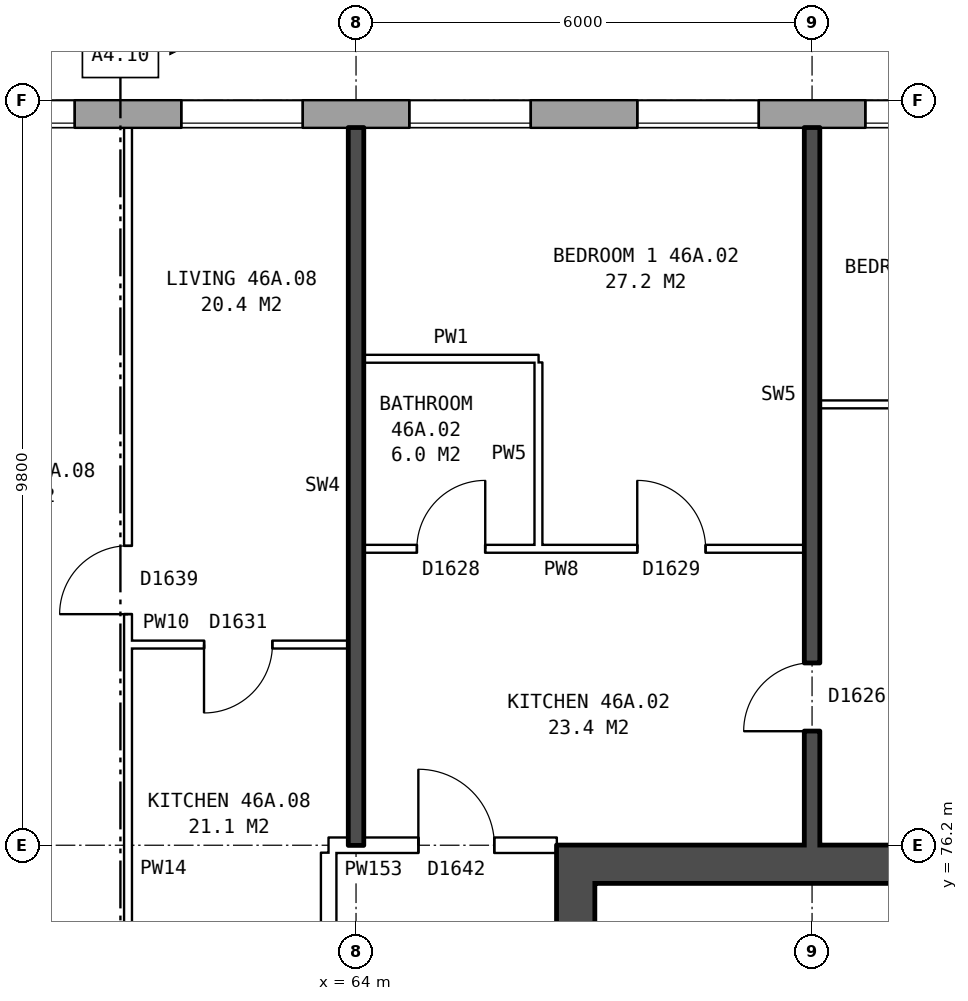
"""IFC4 building model, lengths in metres.
Left out: names, types, materials, properties, quantities, classifications, styles, units other than length and angle.
Written with IfcOpenShell. Run it as: python <this file> out.ifc"""

import sys

from ifc_helpers import new_model, si_unit, direction, frame, frame_2d, origin, place, context, subcontext, project, spatial, rectangle, extrude, element, fill, save


model = new_model("IFC4")
c1 = context("Model", 3, precision=1e-05, world=origin(), true_north=direction((0.0, 1.0)))
c2 = subcontext(c1, "Body", "Model", "MODEL_VIEW")
j1 = project(units=[si_unit("LENGTHUNIT", "METRE"), si_unit("PLANEANGLEUNIT", "RADIAN")], contexts=[c1])
p1 = place(None, origin())
s1 = spatial("IfcSite", under=j1, at=p1, CompositionType="ELEMENT")
p2 = place(p1, origin())
s2 = spatial("IfcBuilding", under=s1, at=p2, CompositionType="ELEMENT")
p3 = place(p2, frame((0.0, 0.0, 164.0)))
s3 = spatial("IfcBuildingStorey", under=s2, at=p3, CompositionType="ELEMENT", Elevation=164.0)
p4 = place(p3, frame((72.925, 85.82, 0.0), z_axis=(0.0, 0.0, 1.0), x_axis=(-1.0, 0.0, 0.0)))
e1 = element("IfcWall", 1, at=p4, inside=s3, PredefinedType="STANDARD", context=c2, shape_type="SweptSolid", body=[
    extrude(rectangle(XDim=41.351, YDim=0.36, at=frame_2d((20.675, 0.0))), origin(), (0.0, 0.0, 1.0), 2.85),
])
p5 = place(p4, frame((0.625, 0.0, 0.8)))
e2 = element("IfcOpeningElement", 2, at=p5, cuts=e1, PredefinedType="OPENING", context=c2, shape_type="SweptSolid", body=[
    extrude(rectangle(XDim=1.6, YDim=1.8, at=frame_2d((0.8, 0.9))), frame((0.0, 0.19, 0.0), z_axis=(0.0, -1.0, 0.0), x_axis=(1.0, 0.0, 0.0)), (0.0, 0.0, 1.0), 0.38),
])
p6 = place(p4, frame((3.625, 0.0, 0.8)))
e3 = element("IfcOpeningElement", 3, at=p6, cuts=e1, PredefinedType="OPENING", context=c2, shape_type="SweptSolid", body=[
    extrude(rectangle(XDim=1.6, YDim=1.8, at=frame_2d((0.8, 0.9))), frame((0.0, 0.19, 0.0), z_axis=(0.0, -1.0, 0.0), x_axis=(1.0, 0.0, 0.0)), (0.0, 0.0, 1.0), 0.38),
])
p7 = place(p4, frame((6.625, 0.0, 0.8)))
e4 = element("IfcOpeningElement", 4, at=p7, cuts=e1, PredefinedType="OPENING", context=c2, shape_type="SweptSolid", body=[
    extrude(rectangle(XDim=1.6, YDim=1.8, at=frame_2d((0.8, 0.9))), frame((0.0, 0.19, 0.0), z_axis=(0.0, -1.0, 0.0), x_axis=(1.0, 0.0, 0.0)), (0.0, 0.0, 1.0), 0.38),
])
p8 = place(p4, frame((9.625, 0.0, 0.8)))
e5 = element("IfcOpeningElement", 5, at=p8, cuts=e1, PredefinedType="OPENING", context=c2, shape_type="SweptSolid", body=[
    extrude(rectangle(XDim=1.6, YDim=1.8, at=frame_2d((0.8, 0.9))), frame((0.0, 0.19, 0.0), z_axis=(0.0, -1.0, 0.0), x_axis=(1.0, 0.0, 0.0)), (0.0, 0.0, 1.0), 0.38),
])
p9 = place(p4, frame((12.625, 0.0, 0.8)))
e6 = element("IfcOpeningElement", 6, at=p9, cuts=e1, PredefinedType="OPENING", context=c2, shape_type="SweptSolid", body=[
    extrude(rectangle(XDim=1.6, YDim=1.8, at=frame_2d((0.8, 0.9))), frame((0.0, 0.19, 0.0), z_axis=(0.0, -1.0, 0.0), x_axis=(1.0, 0.0, 0.0)), (0.0, 0.0, 1.0), 0.38),
])
p10 = place(p4, frame((15.625, 0.0, 0.8)))
e7 = element("IfcOpeningElement", 7, at=p10, cuts=e1, PredefinedType="OPENING", context=c2, shape_type="SweptSolid", body=[
    extrude(rectangle(XDim=1.6, YDim=1.8, at=frame_2d((0.8, 0.9))), frame((0.0, 0.19, 0.0), z_axis=(0.0, -1.0, 0.0), x_axis=(1.0, 0.0, 0.0)), (0.0, 0.0, 1.0), 0.38),
])
p11 = place(p4, frame((18.075, 0.0, 1.65)))
e8 = element("IfcOpeningElement", 8, at=p11, cuts=e1, PredefinedType="OPENING", context=c2, shape_type="SweptSolid", body=[
    extrude(rectangle(XDim=0.6, YDim=0.9, at=frame_2d((0.3, 0.45))), frame((0.0, 0.19, 0.0), z_axis=(0.0, -1.0, 0.0), x_axis=(1.0, 0.0, 0.0)), (0.0, 0.0, 1.0), 0.38),
])
p12 = place(p4, frame((21.125, 0.0, 0.15)))
e9 = element("IfcOpeningElement", 9, at=p12, cuts=e1, PredefinedType="OPENING", context=c2, shape_type="SweptSolid", body=[
    extrude(rectangle(XDim=1.0, YDim=0.9, at=frame_2d((0.5, 0.45))), frame((0.0, 0.19, 0.0), z_axis=(0.0, -1.0, 0.0), x_axis=(1.0, 0.0, 0.0)), (0.0, 0.0, 1.0), 0.38),
])
p13 = place(p4, frame((24.625, 0.0, 0.8)))
e10 = element("IfcOpeningElement", 10, at=p13, cuts=e1, PredefinedType="OPENING", context=c2, shape_type="SweptSolid", body=[
    extrude(rectangle(XDim=1.6, YDim=1.8, at=frame_2d((0.8, 0.9))), frame((0.0, 0.19, 0.0), z_axis=(0.0, -1.0, 0.0), x_axis=(1.0, 0.0, 0.0)), (0.0, 0.0, 1.0), 0.38),
])
p14 = place(p4, frame((27.625, 0.0, 0.8)))
e11 = element("IfcOpeningElement", 11, at=p14, cuts=e1, PredefinedType="OPENING", context=c2, shape_type="SweptSolid", body=[
    extrude(rectangle(XDim=1.6, YDim=1.8, at=frame_2d((0.8, 0.9))), frame((0.0, 0.19, 0.0), z_axis=(0.0, -1.0, 0.0), x_axis=(1.0, 0.0, 0.0)), (0.0, 0.0, 1.0), 0.38),
])
p15 = place(p4, frame((30.625, 0.0, 0.8)))
e12 = element("IfcOpeningElement", 12, at=p15, cuts=e1, PredefinedType="OPENING", context=c2, shape_type="SweptSolid", body=[
    extrude(rectangle(XDim=1.6, YDim=1.8, at=frame_2d((0.8, 0.9))), frame((0.0, 0.19, 0.0), z_axis=(0.0, -1.0, 0.0), x_axis=(1.0, 0.0, 0.0)), (0.0, 0.0, 1.0), 0.38),
])
p16 = place(p4, frame((33.625, 0.0, 0.8)))
e13 = element("IfcOpeningElement", 13, at=p16, cuts=e1, PredefinedType="OPENING", context=c2, shape_type="SweptSolid", body=[
    extrude(rectangle(XDim=1.6, YDim=1.8, at=frame_2d((0.8, 0.9))), frame((0.0, 0.19, 0.0), z_axis=(0.0, -1.0, 0.0), x_axis=(1.0, 0.0, 0.0)), (0.0, 0.0, 1.0), 0.38),
])
p17 = place(p4, frame((36.625, 0.0, 0.8)))
e14 = element("IfcOpeningElement", 14, at=p17, cuts=e1, PredefinedType="OPENING", context=c2, shape_type="SweptSolid", body=[
    extrude(rectangle(XDim=1.6, YDim=1.8, at=frame_2d((0.8, 0.9))), frame((0.0, 0.19, 0.0), z_axis=(0.0, -1.0, 0.0), x_axis=(1.0, 0.0, 0.0)), (0.0, 0.0, 1.0), 0.38),
])
p18 = place(p4, frame((19.225, 0.0, 0.15)))
e15 = element("IfcOpeningElement", 15, at=p18, cuts=e1, PredefinedType="OPENING", context=c2, shape_type="SweptSolid", body=[
    extrude(rectangle(XDim=0.6, YDim=0.9, at=frame_2d((0.3, 0.45))), frame((0.0, 0.19, 0.0), z_axis=(0.0, -1.0, 0.0), x_axis=(1.0, 0.0, 0.0)), (0.0, 0.0, 1.0), 0.38),
])
p19 = place(p4, frame((20.125, 0.0, 0.25)))
e16 = element("IfcOpeningElement", 16, at=p19, cuts=e1, PredefinedType="OPENING", context=c2, shape_type="SweptSolid", body=[
    extrude(rectangle(XDim=0.6, YDim=1.5, at=frame_2d((0.3, 0.75))), frame((0.0, 0.19, 0.0), z_axis=(0.0, -1.0, 0.0), x_axis=(1.0, 0.0, 0.0)), (0.0, 0.0, 1.0), 0.38),
])
p20 = place(p4, frame((22.625, 0.0, 1.65)))
e17 = element("IfcOpeningElement", 17, at=p20, cuts=e1, PredefinedType="OPENING", context=c2, shape_type="SweptSolid", body=[
    extrude(rectangle(XDim=1.0, YDim=0.9, at=frame_2d((0.5, 0.45))), frame((0.0, 0.19, 0.0), z_axis=(0.0, -1.0, 0.0), x_axis=(1.0, 0.0, 0.0)), (0.0, 0.0, 1.0), 0.38),
])
p21 = place(p3, frame((66.89, 63.8, 0.0), z_axis=(0.0, 0.0, 1.0), x_axis=(0.0, 1.0, 0.0)))
e18 = element("IfcWall", 18, at=p21, inside=s3, PredefinedType="SHEAR", context=c2, shape_type="SweptSolid", body=[
    extrude(rectangle(XDim=12.4, YDim=0.5, at=frame_2d((6.2, 0.0))), origin(), (0.0, 0.0, 1.0), 2.85),
])
p22 = place(p21, frame((1.325, 0.0, 0.0)))
e19 = element("IfcOpeningElement", 19, at=p22, cuts=e18, PredefinedType="OPENING", context=c2, shape_type="SweptSolid", body=[
    extrude(rectangle(XDim=1.1, YDim=2.1, at=frame_2d((0.55, 1.05))), frame((0.0, 0.26, 0.0), z_axis=(0.0, -1.0, 0.0), x_axis=(1.0, 0.0, 0.0)), (0.0, 0.0, 1.0), 0.52),
])
p23 = place(p21, frame((3.6, 0.0, 0.0)))
e20 = element("IfcOpeningElement", 20, at=p23, cuts=e18, PredefinedType="OPENING", context=c2, shape_type="SweptSolid", body=[
    extrude(rectangle(XDim=1.1, YDim=2.1, at=frame_2d((0.55, 1.05))), frame((0.0, 0.26, 0.0), z_axis=(0.0, -1.0, 0.0), x_axis=(1.0, 0.0, 0.0)), (0.0, 0.0, 1.0), 0.52),
])
p24 = place(p21, frame((5.8, 0.0, 0.0)))
e21 = element("IfcOpeningElement", 21, at=p24, cuts=e18, PredefinedType="OPENING", context=c2, shape_type="SweptSolid", body=[
    extrude(rectangle(XDim=1.1, YDim=2.1, at=frame_2d((0.55, 1.05))), frame((0.0, 0.26, 0.0), z_axis=(0.0, -1.0, 0.0), x_axis=(1.0, 0.0, 0.0)), (0.0, 0.0, 1.0), 0.52),
])
p25 = place(p21, frame((8.0, 0.0, 0.0)))
e22 = element("IfcOpeningElement", 22, at=p25, cuts=e18, PredefinedType="OPENING", context=c2, shape_type="SweptSolid", body=[
    extrude(rectangle(XDim=1.1, YDim=2.1, at=frame_2d((0.55, 1.05))), frame((0.0, 0.26, 0.0), z_axis=(0.0, -1.0, 0.0), x_axis=(1.0, 0.0, 0.0)), (0.0, 0.0, 1.0), 0.52),
])
p26 = place(p21, frame((9.9, 0.0, 0.0)))
e23 = element("IfcOpeningElement", 23, at=p26, cuts=e18, PredefinedType="OPENING", context=c2, shape_type="SweptSolid", body=[
    extrude(rectangle(XDim=1.1, YDim=2.1, at=frame_2d((0.55, 1.05))), frame((0.0, 0.26, 0.0), z_axis=(0.0, -1.0, 0.0), x_axis=(1.0, 0.0, 0.0)), (0.0, 0.0, 1.0), 0.52),
])
p27 = place(p3, frame((67.14, 75.95, 0.0), z_axis=(0.0, 0.0, 1.0), x_axis=(1.0, 0.0, 0.0)))
e24 = element("IfcWall", 24, at=p27, inside=s3, PredefinedType="SHEAR", context=c2, shape_type="SweptSolid", body=[
    extrude(rectangle(XDim=8.0, YDim=0.5, at=frame_2d((4.0, 0.0))), origin(), (0.0, 0.0, 1.0), 2.85),
])
p28 = place(p3, frame((63.64, 63.9, 0.0), z_axis=(0.0, 0.0, 1.0), x_axis=(0.0, 1.0, 0.0)))
e25 = element("IfcWall", 25, at=p28, inside=s3, PredefinedType="PARTITIONING", context=c2, shape_type="SweptSolid", body=[
    extrude(rectangle(XDim=12.2, YDim=0.2, at=frame_2d((6.1, 0.0))), origin(), (0.0, 0.0, 1.0), 2.85),
])
p29 = place(p28, frame((5.1, 0.0, 0.0)))
e26 = element("IfcOpeningElement", 26, at=p29, cuts=e25, PredefinedType="OPENING", context=c2, shape_type="SweptSolid", body=[
    extrude(rectangle(XDim=2.0, YDim=2.1, at=frame_2d((1.0, 1.05))), frame((0.0, 0.11, 0.0), z_axis=(0.0, -1.0, 0.0), x_axis=(1.0, 0.0, 0.0)), (0.0, 0.0, 1.0), 0.22),
])
p30 = place(p3, frame((63.64, 76.2, 0.0), z_axis=(0.0, 0.0, 1.0), x_axis=(1.0, 0.0, 0.0)))
e27 = element("IfcWall", 27, at=p30, inside=s3, PredefinedType="PARTITIONING", context=c2, shape_type="SweptSolid", body=[
    extrude(rectangle(XDim=3.0, YDim=0.2, at=frame_2d((1.5, 0.0))), origin(), (0.0, 0.0, 1.0), 2.85),
])
p31 = place(p30, frame((1.18, 0.0, 0.0)))
e28 = element("IfcOpeningElement", 28, at=p31, cuts=e27, PredefinedType="OPENING", context=c2, shape_type="SweptSolid", body=[
    extrude(rectangle(XDim=1.0, YDim=2.1, at=frame_2d((0.5, 1.05))), frame((0.0, 0.11, 0.0), z_axis=(0.0, -1.0, 0.0), x_axis=(1.0, 0.0, 0.0)), (0.0, 0.0, 1.0), 0.22),
])
p32 = place(p3, frame((61.0, 78.84, 0.0), z_axis=(0.0, 0.0, 1.0), x_axis=(1.0, 0.0, 0.0)))
e29 = element("IfcWall", 29, at=p32, inside=s3, PredefinedType="PARTITIONING", context=c2, shape_type="SweptSolid", body=[
    extrude(rectangle(XDim=2.9, YDim=0.1, at=frame_2d((1.45, 0.0))), origin(), (0.0, 0.0, 1.0), 2.85),
])
p33 = place(p32, frame((1.0, 0.0, 0.0)))
e30 = element("IfcOpeningElement", 30, at=p33, cuts=e29, PredefinedType="OPENING", context=c2, shape_type="SweptSolid", body=[
    extrude(rectangle(XDim=0.9, YDim=2.1, at=frame_2d((0.45, 1.05))), frame((0.0, 0.06, 0.0), z_axis=(0.0, -1.0, 0.0), x_axis=(1.0, 0.0, 0.0)), (0.0, 0.0, 1.0), 0.12),
])
p34 = place(p3, frame((64.1, 80.1, 0.0), z_axis=(0.0, 0.0, 1.0), x_axis=(1.0, 0.0, 0.0)))
e31 = element("IfcWall", 31, at=p34, inside=s3, PredefinedType="PARTITIONING", context=c2, shape_type="SweptSolid", body=[
    extrude(rectangle(XDim=5.8, YDim=0.1, at=frame_2d((2.9, 0.0))), origin(), (0.0, 0.0, 1.0), 2.85),
])
p35 = place(p34, frame((3.6, 0.0, 0.0)))
e32 = element("IfcOpeningElement", 32, at=p35, cuts=e31, PredefinedType="OPENING", context=c2, shape_type="SweptSolid", body=[
    extrude(rectangle(XDim=0.9, YDim=2.1, at=frame_2d((0.45, 1.05))), frame((0.0, 0.06, 0.0), z_axis=(0.0, -1.0, 0.0), x_axis=(1.0, 0.0, 0.0)), (0.0, 0.0, 1.0), 0.12),
])
p36 = place(p34, frame((0.7, 0.0, 0.0)))
e33 = element("IfcOpeningElement", 33, at=p36, cuts=e31, PredefinedType="OPENING", context=c2, shape_type="SweptSolid", body=[
    extrude(rectangle(XDim=0.9, YDim=2.1, at=frame_2d((0.45, 1.05))), frame((0.0, 0.06, 0.0), z_axis=(0.0, -1.0, 0.0), x_axis=(1.0, 0.0, 0.0)), (0.0, 0.0, 1.0), 0.12),
])
p37 = place(p3, frame((70.1, 82.0, 0.0), z_axis=(0.0, 0.0, 1.0), x_axis=(1.0, 0.0, 0.0)))
e34 = element("IfcWall", 34, at=p37, inside=s3, PredefinedType="PARTITIONING", context=c2, shape_type="SweptSolid", body=[
    extrude(rectangle(XDim=5.54, YDim=0.1, at=frame_2d((2.77, 0.0))), origin(), (0.0, 0.0, 1.0), 2.85),
])
p38 = place(p37, frame((2.32, 0.0, 0.0)))
e35 = element("IfcOpeningElement", 35, at=p38, cuts=e34, PredefinedType="OPENING", context=c2, shape_type="SweptSolid", body=[
    extrude(rectangle(XDim=0.9, YDim=2.1, at=frame_2d((0.45, 1.05))), frame((0.0, 0.06, 0.0), z_axis=(0.0, -1.0, 0.0), x_axis=(1.0, 0.0, 0.0)), (0.0, 0.0, 1.0), 0.12),
])
p39 = place(p3, frame((64.1, 82.6, 0.0), z_axis=(0.0, 0.0, 1.0), x_axis=(1.0, 0.0, 0.0)))
e36 = element("IfcWall", 36, at=p39, inside=s3, PredefinedType="PARTITIONING", context=c2, shape_type="SweptSolid", body=[
    extrude(rectangle(XDim=2.3, YDim=0.1, at=frame_2d((1.15, 0.0))), origin(), (0.0, 0.0, 1.0), 2.85),
])
p40 = place(p3, frame((61.0, 71.3, 0.0), z_axis=(0.0, 0.0, 1.0), x_axis=(0.0, 1.0, 0.0)))
e37 = element("IfcWall", 37, at=p40, inside=s3, PredefinedType="PARTITIONING", context=c2, shape_type="SweptSolid", body=[
    extrude(rectangle(XDim=14.34, YDim=0.1, at=frame_2d((7.17, 0.0))), origin(), (0.0, 0.0, 1.0), 2.85),
])
p41 = place(p40, frame((7.94, 0.0, 0.0)))
e38 = element("IfcOpeningElement", 38, at=p41, cuts=e37, PredefinedType="OPENING", context=c2, shape_type="SweptSolid", body=[
    extrude(rectangle(XDim=0.9, YDim=2.1, at=frame_2d((0.45, 1.05))), frame((0.0, 0.06, 0.0), z_axis=(0.0, -1.0, 0.0), x_axis=(1.0, 0.0, 0.0)), (0.0, 0.0, 1.0), 0.12),
])
p42 = place(p40, frame((0.9, 0.0, 0.0)))
e39 = element("IfcOpeningElement", 39, at=p42, cuts=e37, PredefinedType="OPENING", context=c2, shape_type="SweptSolid", body=[
    extrude(rectangle(XDim=0.9, YDim=2.1, at=frame_2d((0.45, 1.05))), frame((0.0, 0.06, 0.0), z_axis=(0.0, -1.0, 0.0), x_axis=(1.0, 0.0, 0.0)), (0.0, 0.0, 1.0), 0.12),
])
p43 = place(p3, frame((64.0, 76.2, 0.0), z_axis=(0.0, 0.0, 1.0), x_axis=(0.0, 1.0, 0.0)))
e40 = element("IfcWall", 40, at=p43, inside=s3, PredefinedType="SOLIDWALL", context=c2, shape_type="SweptSolid", body=[
    extrude(rectangle(XDim=9.44, YDim=0.2, at=frame_2d((4.72, 0.0))), origin(), (0.0, 0.0, 1.0), 2.85),
])
p44 = place(p3, frame((66.4, 80.15, 0.0), z_axis=(0.0, 0.0, 1.0), x_axis=(0.0, 1.0, 0.0)))
e41 = element("IfcWall", 41, at=p44, inside=s3, PredefinedType="PARTITIONING", context=c2, shape_type="SweptSolid", body=[
    extrude(rectangle(XDim=2.4, YDim=0.1, at=frame_2d((1.2, 0.0))), origin(), (0.0, 0.0, 1.0), 2.85),
])
p45 = place(p3, frame((70.0, 76.2, 0.0), z_axis=(0.0, 0.0, 1.0), x_axis=(0.0, 1.0, 0.0)))
e42 = element("IfcWall", 42, at=p45, inside=s3, PredefinedType="SOLIDWALL", context=c2, shape_type="SweptSolid", body=[
    extrude(rectangle(XDim=9.44, YDim=0.2, at=frame_2d((4.72, 0.0))), origin(), (0.0, 0.0, 1.0), 2.85),
])
p46 = place(p45, frame((1.5, 0.0, 0.0)))
e43 = element("IfcOpeningElement", 43, at=p46, cuts=e42, PredefinedType="OPENING", context=c2, shape_type="SweptSolid", body=[
    extrude(rectangle(XDim=0.9, YDim=2.1, at=frame_2d((0.45, 1.05))), frame((0.0, 0.11, 0.0), z_axis=(0.0, -1.0, 0.0), x_axis=(1.0, 0.0, 0.0)), (0.0, 0.0, 1.0), 0.22),
])
p47 = place(p5, origin())
e44 = element("IfcWindow", 44, at=p47, inside=s3, PartitioningType="SINGLE_PANEL", PredefinedType="WINDOW", context=c2, shape_type="SweptSolid", body=[
    extrude(rectangle(XDim=1.6, YDim=1.8, at=frame_2d((0.8, 0.9))), frame((0.0, 0.15, 0.0), z_axis=(0.0, -1.0, 0.0), x_axis=(1.0, 0.0, 0.0)), (0.0, 0.0, 1.0), 0.06),
])
fill(e2, e44)
p48 = place(p6, origin())
e45 = element("IfcWindow", 45, at=p48, inside=s3, PartitioningType="SINGLE_PANEL", PredefinedType="WINDOW", context=c2, shape_type="SweptSolid", body=[
    extrude(rectangle(XDim=1.6, YDim=1.8, at=frame_2d((0.8, 0.9))), frame((0.0, 0.15, 0.0), z_axis=(0.0, -1.0, 0.0), x_axis=(1.0, 0.0, 0.0)), (0.0, 0.0, 1.0), 0.06),
])
fill(e3, e45)
p49 = place(p7, origin())
e46 = element("IfcWindow", 46, at=p49, inside=s3, PartitioningType="SINGLE_PANEL", PredefinedType="WINDOW", context=c2, shape_type="SweptSolid", body=[
    extrude(rectangle(XDim=1.6, YDim=1.8, at=frame_2d((0.8, 0.9))), frame((0.0, 0.15, 0.0), z_axis=(0.0, -1.0, 0.0), x_axis=(1.0, 0.0, 0.0)), (0.0, 0.0, 1.0), 0.06),
])
fill(e4, e46)
p50 = place(p8, origin())
e47 = element("IfcWindow", 47, at=p50, inside=s3, PartitioningType="SINGLE_PANEL", PredefinedType="WINDOW", context=c2, shape_type="SweptSolid", body=[
    extrude(rectangle(XDim=1.6, YDim=1.8, at=frame_2d((0.8, 0.9))), frame((0.0, 0.15, 0.0), z_axis=(0.0, -1.0, 0.0), x_axis=(1.0, 0.0, 0.0)), (0.0, 0.0, 1.0), 0.06),
])
fill(e5, e47)
p51 = place(p9, origin())
e48 = element("IfcWindow", 48, at=p51, inside=s3, PartitioningType="SINGLE_PANEL", PredefinedType="WINDOW", context=c2, shape_type="SweptSolid", body=[
    extrude(rectangle(XDim=1.6, YDim=1.8, at=frame_2d((0.8, 0.9))), frame((0.0, 0.15, 0.0), z_axis=(0.0, -1.0, 0.0), x_axis=(1.0, 0.0, 0.0)), (0.0, 0.0, 1.0), 0.06),
])
fill(e6, e48)
p52 = place(p35, origin())
e49 = element("IfcDoor", 49, at=p52, inside=s3, OperationType="SINGLE_SWING_LEFT", PredefinedType="DOOR", context=c2, shape_type="SweptSolid", body=[
    extrude(rectangle(XDim=0.9, YDim=2.1, at=frame_2d((0.45, 1.05))), frame((0.0, 0.025, 0.0), z_axis=(0.0, -1.0, 0.0), x_axis=(1.0, 0.0, 0.0)), (0.0, 0.0, 1.0), 0.05),
])
fill(e32, e49)
p53 = place(p31, origin())
e50 = element("IfcDoor", 50, at=p53, inside=s3, OperationType="SINGLE_SWING_LEFT", PredefinedType="DOOR", context=c2, shape_type="SweptSolid", body=[
    extrude(rectangle(XDim=1.0, YDim=2.1, at=frame_2d((0.5, 1.05))), frame((0.0, 0.025, 0.0), z_axis=(0.0, -1.0, 0.0), x_axis=(1.0, 0.0, 0.0)), (0.0, 0.0, 1.0), 0.05),
])
fill(e28, e50)
p54 = place(p46, origin())
e51 = element("IfcDoor", 51, at=p54, inside=s3, OperationType="SINGLE_SWING_LEFT", PredefinedType="DOOR", context=c2, shape_type="SweptSolid", body=[
    extrude(rectangle(XDim=0.9, YDim=2.1, at=frame_2d((0.45, 1.05))), frame((0.0, 0.025, 0.0), z_axis=(0.0, -1.0, 0.0), x_axis=(1.0, 0.0, 0.0)), (0.0, 0.0, 1.0), 0.05),
])
fill(e43, e51)
p55 = place(p36, origin())
e52 = element("IfcDoor", 52, at=p55, inside=s3, OperationType="SINGLE_SWING_RIGHT", PredefinedType="DOOR", context=c2, shape_type="SweptSolid", body=[
    extrude(rectangle(XDim=0.9, YDim=2.1, at=frame_2d((0.45, 1.05))), frame((0.0, 0.025, 0.0), z_axis=(0.0, -1.0, 0.0), x_axis=(1.0, 0.0, 0.0)), (0.0, 0.0, 1.0), 0.05),
])
fill(e33, e52)
p56 = place(p41, origin())
e53 = element("IfcDoor", 53, at=p56, inside=s3, OperationType="SINGLE_SWING_LEFT", PredefinedType="DOOR", context=c2, shape_type="SweptSolid", body=[
    extrude(rectangle(XDim=0.9, YDim=2.1, at=frame_2d((0.45, 1.05))), frame((0.0, 0.025, 0.0), z_axis=(0.0, -1.0, 0.0), x_axis=(1.0, 0.0, 0.0)), (0.0, 0.0, 1.0), 0.05),
])
fill(e38, e53)
p57 = place(p33, frame((0.9, 0.0, 0.0), z_axis=(0.0, 0.0, 1.0), x_axis=(-1.0, 0.0, 0.0)))
e54 = element("IfcDoor", 54, at=p57, inside=s3, OperationType="SINGLE_SWING_RIGHT", PredefinedType="DOOR", context=c2, shape_type="SweptSolid", body=[
    extrude(rectangle(XDim=0.9, YDim=2.1, at=frame_2d((0.45, 1.05))), frame((0.0, 0.025, 0.0), z_axis=(0.0, -1.0, 0.0), x_axis=(1.0, 0.0, 0.0)), (0.0, 0.0, 1.0), 0.05),
])
fill(e30, e54)
save(model, sys.argv[1])
